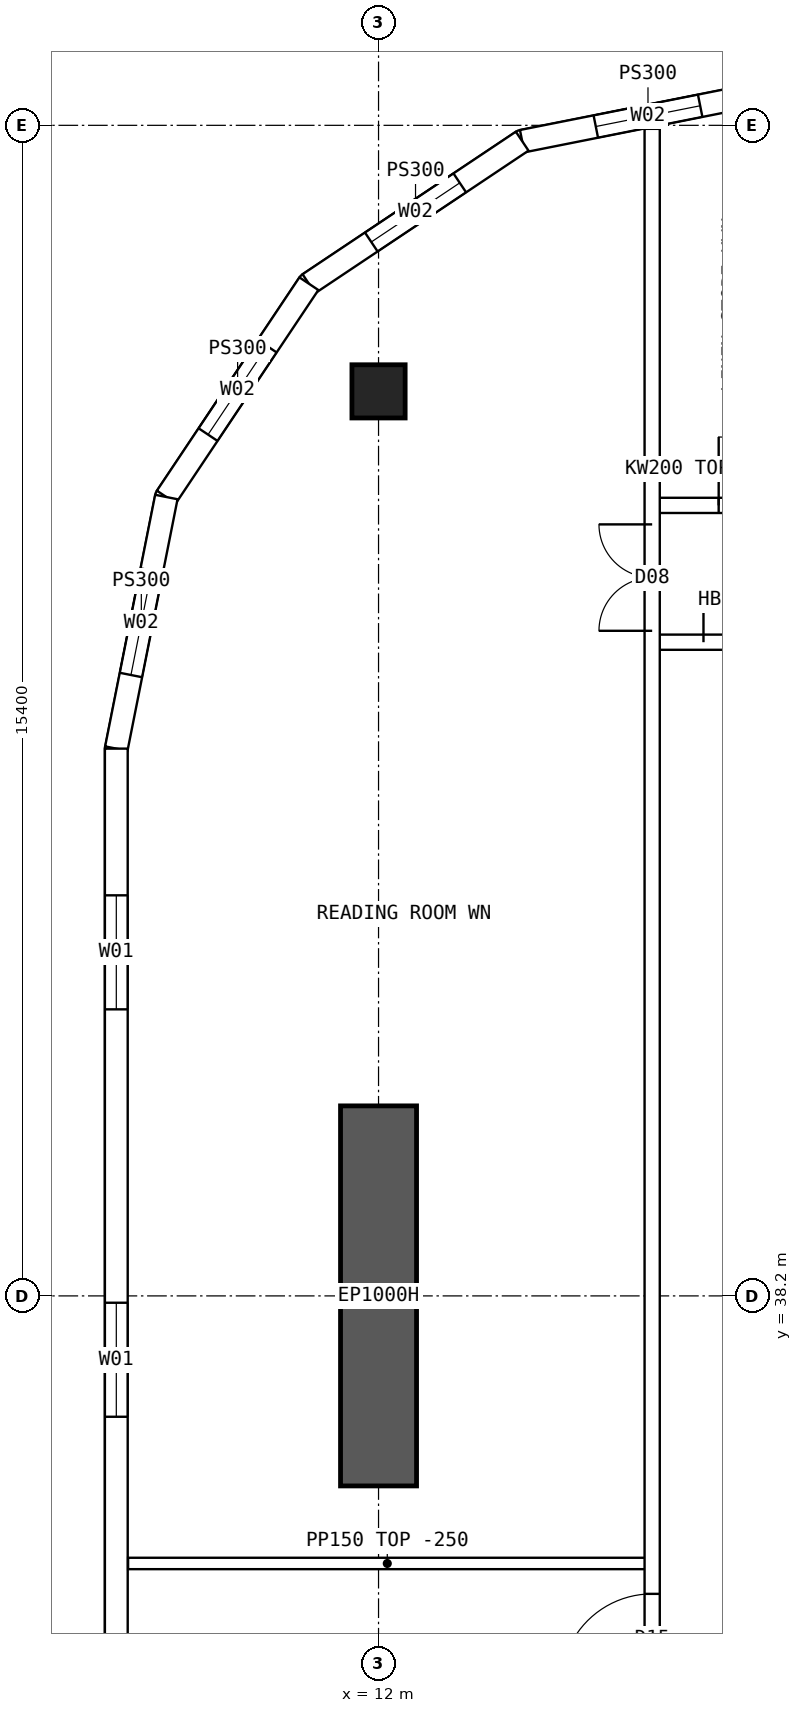
"""IFC4 building model, lengths in metres.
Left out: names, types, materials, properties, quantities, classifications, styles, units other than length and angle.
Written with IfcOpenShell. Run it as: python <this file> out.ifc"""

import sys

from ifc_helpers import new_model, si_unit, direction, frame, frame_2d, origin, origin_2d, place, context, subcontext, project, spatial, polyline, rectangle, hollow_rectangle, outline, extrude, element, fill, save


model = new_model("IFC4")
c1 = context("Model", 3, precision=1e-05, world=origin(), true_north=direction((0.0, 1.0)))
c2 = subcontext(c1, "Body", "Model", "MODEL_VIEW")
j1 = project(units=[si_unit("LENGTHUNIT", "METRE"), si_unit("PLANEANGLEUNIT", "RADIAN")], contexts=[c1])
p1 = place(None, origin())
s1 = spatial("IfcSite", under=j1, at=p1, CompositionType="ELEMENT")
p2 = place(p1, origin())
s2 = spatial("IfcBuilding", under=s1, at=p2, CompositionType="ELEMENT")
p3 = place(p2, frame((0.0, 0.0, 186.1)))
s3 = spatial("IfcBuildingStorey", under=s2, at=p3, CompositionType="ELEMENT", Elevation=186.1)
p4 = place(p3, frame((12.0, 50.1, 0.0), z_axis=(0.0, 0.0, 1.0), x_axis=(1.0, 0.0, 0.0)))
e1 = element("IfcColumn", 1, at=p4, inside=s3, PredefinedType="COLUMN", context=c2, shape_type="SweptSolid", body=[
    extrude(hollow_rectangle(XDim=0.7, YDim=0.7, WallThickness=0.07, at=origin_2d()), origin(), (0.0, 0.0, 1.0), 3.75),
])
p5 = place(p3, frame((12.0, 35.7, 0.0), z_axis=(0.0, 0.0, 1.0), x_axis=(0.0, 1.0, 0.0)))
e2 = element("IfcWall", 2, at=p5, inside=s3, PredefinedType="SHEAR", context=c2, shape_type="SweptSolid", body=[
    extrude(rectangle(XDim=5.0, YDim=1.0, at=frame_2d((2.5, 0.0))), origin(), (0.0, 0.0, 1.0), 3.75),
])
p6 = place(p3, frame((8.55, 45.4, 0.0), z_axis=(0.0, 0.0, 1.0), x_axis=(0.0, -1.0, 0.0)))
e3 = element("IfcWall", 3, at=p6, inside=s3, PredefinedType="SOLIDWALL", context=c2, shape_type="SweptSolid", body=[
    extrude(outline(polyline([(-0.015, -0.15), (26.815, -0.15), (26.785, 0.15), (0.015, 0.15), (-0.015, -0.15)])), origin(), (0.0, 0.0, 1.0), 3.5),
])
p7 = place(p6, frame((1.93, 0.0, 0.9)))
e4 = element("IfcOpeningElement", 4, at=p7, cuts=e3, PredefinedType="OPENING", context=c2, shape_type="SweptSolid", body=[
    extrude(rectangle(XDim=1.5, YDim=2.0, at=frame_2d((0.75, 1.0))), frame((0.0, 0.16, 0.0), z_axis=(0.0, -1.0, 0.0), x_axis=(1.0, 0.0, 0.0)), (0.0, 0.0, 1.0), 0.32),
])
p8 = place(p6, frame((7.29, 0.0, 0.9)))
e5 = element("IfcOpeningElement", 5, at=p8, cuts=e3, PredefinedType="OPENING", context=c2, shape_type="SweptSolid", body=[
    extrude(rectangle(XDim=1.5, YDim=2.0, at=frame_2d((0.75, 1.0))), frame((0.0, 0.16, 0.0), z_axis=(0.0, -1.0, 0.0), x_axis=(1.0, 0.0, 0.0)), (0.0, 0.0, 1.0), 0.32),
])
p9 = place(p6, frame((12.65, 0.0, 0.9)))
e6 = element("IfcOpeningElement", 6, at=p9, cuts=e3, PredefinedType="OPENING", context=c2, shape_type="SweptSolid", body=[
    extrude(rectangle(XDim=1.5, YDim=2.0, at=frame_2d((0.75, 1.0))), frame((0.0, 0.16, 0.0), z_axis=(0.0, -1.0, 0.0), x_axis=(1.0, 0.0, 0.0)), (0.0, 0.0, 1.0), 0.32),
])
p10 = place(p6, frame((18.01, 0.0, 0.9)))
e7 = element("IfcOpeningElement", 7, at=p10, cuts=e3, PredefinedType="OPENING", context=c2, shape_type="SweptSolid", body=[
    extrude(rectangle(XDim=1.5, YDim=2.0, at=frame_2d((0.75, 1.0))), frame((0.0, 0.16, 0.0), z_axis=(0.0, -1.0, 0.0), x_axis=(1.0, 0.0, 0.0)), (0.0, 0.0, 1.0), 0.32),
])
p11 = place(p6, frame((23.37, 0.0, 0.9)))
e8 = element("IfcOpeningElement", 8, at=p11, cuts=e3, PredefinedType="OPENING", context=c2, shape_type="SweptSolid", body=[
    extrude(rectangle(XDim=1.5, YDim=2.0, at=frame_2d((0.75, 1.0))), frame((0.0, 0.16, 0.0), z_axis=(0.0, -1.0, 0.0), x_axis=(1.0, 0.0, 0.0)), (0.0, 0.0, 1.0), 0.32),
])
p12 = place(p3, frame((17.2, 54.05, 0.0), z_axis=(0.0, 0.0, 1.0), x_axis=(-0.98078325777, -0.195100490205, 0.0)))
e9 = element("IfcWall", 9, at=p12, inside=s3, PredefinedType="SOLIDWALL", context=c2, shape_type="SweptSolid", body=[
    extrude(outline(polyline([(-0.03, -0.15), (3.405, -0.15), (3.345, 0.15), (0.03, 0.15), (-0.03, -0.15)])), origin(), (0.0, 0.0, 1.0), 3.5),
])
p13 = place(p12, frame((0.988, 0.0, 0.9)))
e10 = element("IfcOpeningElement", 10, at=p13, cuts=e9, PredefinedType="OPENING", context=c2, shape_type="SweptSolid", body=[
    extrude(rectangle(XDim=1.4, YDim=1.8, at=frame_2d((0.7, 0.9))), frame((0.0, 0.16, 0.0), z_axis=(0.0, -1.0, 0.0), x_axis=(1.0, 0.0, 0.0)), (0.0, 0.0, 1.0), 0.32),
])
p14 = place(p3, frame((13.89, 53.392, 0.0), z_axis=(0.0, 0.0, 1.0), x_axis=(-0.831493450887, -0.555534554399, 0.0)))
e11 = element("IfcWall", 11, at=p14, inside=s3, PredefinedType="SOLIDWALL", context=c2, shape_type="SweptSolid", body=[
    extrude(outline(polyline([(-0.03, -0.15), (3.405, -0.15), (3.345, 0.15), (0.03, 0.15), (-0.03, -0.15)])), origin(), (0.0, 0.0, 1.0), 3.5),
])
p15 = place(p14, frame((0.988, 0.0, 0.9)))
e12 = element("IfcOpeningElement", 12, at=p15, cuts=e11, PredefinedType="OPENING", context=c2, shape_type="SweptSolid", body=[
    extrude(rectangle(XDim=1.4, YDim=1.8, at=frame_2d((0.7, 0.9))), frame((0.0, 0.16, 0.0), z_axis=(0.0, -1.0, 0.0), x_axis=(1.0, 0.0, 0.0)), (0.0, 0.0, 1.0), 0.32),
])
p16 = place(p3, frame((11.083, 51.517, 0.0), z_axis=(0.0, 0.0, 1.0), x_axis=(-0.555534554399, -0.831493450887, 0.0)))
e13 = element("IfcWall", 13, at=p16, inside=s3, PredefinedType="SOLIDWALL", context=c2, shape_type="SweptSolid", body=[
    extrude(outline(polyline([(-0.03, -0.15), (3.405, -0.15), (3.345, 0.15), (0.03, 0.15), (-0.03, -0.15)])), origin(), (0.0, 0.0, 1.0), 3.5),
])
p17 = place(p16, frame((0.988, 0.0, 0.9)))
e14 = element("IfcOpeningElement", 14, at=p17, cuts=e13, PredefinedType="OPENING", context=c2, shape_type="SweptSolid", body=[
    extrude(rectangle(XDim=1.4, YDim=1.8, at=frame_2d((0.7, 0.9))), frame((0.0, 0.16, 0.0), z_axis=(0.0, -1.0, 0.0), x_axis=(1.0, 0.0, 0.0)), (0.0, 0.0, 1.0), 0.32),
])
p18 = place(p3, frame((9.208, 48.71, 0.0), z_axis=(0.0, 0.0, 1.0), x_axis=(-0.19508664885, -0.980786011034, 0.0)))
e15 = element("IfcWall", 15, at=p18, inside=s3, PredefinedType="SOLIDWALL", context=c2, shape_type="SweptSolid", body=[
    extrude(outline(polyline([(-0.03, -0.15), (3.39, -0.15), (3.36, 0.15), (0.03, 0.15), (-0.03, -0.15)])), origin(), (0.0, 0.0, 1.0), 3.5),
])
p19 = place(p18, frame((0.988, 0.0, 0.9)))
e16 = element("IfcOpeningElement", 16, at=p19, cuts=e15, PredefinedType="OPENING", context=c2, shape_type="SweptSolid", body=[
    extrude(rectangle(XDim=1.4, YDim=1.8, at=frame_2d((0.7, 0.9))), frame((0.0, 0.16, 0.0), z_axis=(0.0, -1.0, 0.0), x_axis=(1.0, 0.0, 0.0)), (0.0, 0.0, 1.0), 0.32),
])
p20 = place(p3, frame((15.6, 48.6, 0.0), z_axis=(0.0, 0.0, 1.0), x_axis=(1.0, 0.0, 0.0)))
e17 = element("IfcWall", 17, at=p20, inside=s3, PredefinedType="SOLIDWALL", context=c2, shape_type="SweptSolid", body=[
    extrude(rectangle(XDim=1.975, YDim=0.2, at=frame_2d((0.987, 0.0))), origin(), (0.0, 0.0, 1.0), 3.5),
])
p21 = place(p20, frame((0.875, 0.0, 0.0)))
e18 = element("IfcOpeningElement", 18, at=p21, cuts=e17, PredefinedType="OPENING", context=c2, shape_type="SweptSolid", body=[
    extrude(rectangle(XDim=0.9, YDim=2.1, at=frame_2d((0.45, 1.05))), frame((0.0, 0.11, 0.0), z_axis=(0.0, -1.0, 0.0), x_axis=(1.0, 0.0, 0.0)), (0.0, 0.0, 1.0), 0.22),
])
p22 = place(p3, frame((15.6, 46.8, 0.0), z_axis=(0.0, 0.0, 1.0), x_axis=(1.0, 0.0, 0.0)))
e19 = element("IfcWall", 19, at=p22, inside=s3, PredefinedType="SOLIDWALL", context=c2, shape_type="SweptSolid", body=[
    extrude(rectangle(XDim=1.975, YDim=0.2, at=frame_2d((0.987, 0.0))), origin(), (0.0, 0.0, 1.0), 3.5),
])
p23 = place(p22, frame((0.675, 0.0, 0.0)))
e20 = element("IfcOpeningElement", 20, at=p23, cuts=e19, PredefinedType="OPENING", context=c2, shape_type="SweptSolid", body=[
    extrude(rectangle(XDim=1.2, YDim=2.1, at=frame_2d((0.6, 1.05))), frame((0.0, 0.11, 0.0), z_axis=(0.0, -1.0, 0.0), x_axis=(1.0, 0.0, 0.0)), (0.0, 0.0, 1.0), 0.22),
])
p24 = place(p3, frame((15.6, 10.446, 0.0), z_axis=(0.0, 0.0, 1.0), x_axis=(0.0, 1.0, 0.0)))
e21 = element("IfcWall", 21, at=p24, inside=s3, PredefinedType="SOLIDWALL", context=c2, shape_type="SweptSolid", body=[
    extrude(rectangle(XDim=43.107, YDim=0.2, at=frame_2d((21.554, 0.0))), origin(), (0.0, 0.0, 1.0), 3.5),
])
p25 = place(p24, frame((22.634, 0.0, 0.0)))
e22 = element("IfcOpeningElement", 22, at=p25, cuts=e21, PredefinedType="OPENING", context=c2, shape_type="SweptSolid", body=[
    extrude(rectangle(XDim=1.2, YDim=2.1, at=frame_2d((0.6, 1.05))), frame((0.0, 0.11, 0.0), z_axis=(0.0, -1.0, 0.0), x_axis=(1.0, 0.0, 0.0)), (0.0, 0.0, 1.0), 0.22),
])
p26 = place(p24, frame((5.104, 0.0, 0.0)))
e23 = element("IfcOpeningElement", 23, at=p26, cuts=e21, PredefinedType="OPENING", context=c2, shape_type="SweptSolid", body=[
    extrude(rectangle(XDim=1.4, YDim=2.1, at=frame_2d((0.7, 1.05))), frame((0.0, 0.11, 0.0), z_axis=(0.0, -1.0, 0.0), x_axis=(1.0, 0.0, 0.0)), (0.0, 0.0, 1.0), 0.22),
])
p27 = place(p24, frame((36.504, 0.0, 0.0)))
e24 = element("IfcOpeningElement", 24, at=p27, cuts=e21, PredefinedType="OPENING", context=c2, shape_type="SweptSolid", body=[
    extrude(rectangle(XDim=1.4, YDim=2.1, at=frame_2d((0.7, 1.05))), frame((0.0, 0.11, 0.0), z_axis=(0.0, -1.0, 0.0), x_axis=(1.0, 0.0, 0.0)), (0.0, 0.0, 1.0), 0.22),
])
p28 = place(p3, frame((8.705, 34.68, 0.0), z_axis=(0.0, 0.0, 1.0), x_axis=(1.0, 0.0, 0.0)))
e25 = element("IfcWall", 25, at=p28, inside=s3, PredefinedType="PARTITIONING", context=c2, shape_type="SweptSolid", body=[
    extrude(outline(polyline([(0.0, 0.0), (6.82, 0.0), (6.82, 3.5), (3.597, 3.5), (3.595, 3.05), (2.997, 3.05), (2.995, 3.5), (0.0, 3.5), (0.0, 0.0)])), frame((0.0, 0.075, 0.0), z_axis=(0.0, -1.0, 0.0), x_axis=(1.0, 0.0, 0.0)), (0.0, 0.0, 1.0), 0.15),
])
p29 = place(p7, origin())
e26 = element("IfcWindow", 26, at=p29, inside=s3, PartitioningType="SINGLE_PANEL", PredefinedType="WINDOW", context=c2, shape_type="SweptSolid", body=[
    extrude(rectangle(XDim=1.5, YDim=2.0, at=frame_2d((0.75, 1.0))), frame((0.0, 0.03, 0.0), z_axis=(0.0, -1.0, 0.0), x_axis=(1.0, 0.0, 0.0)), (0.0, 0.0, 1.0), 0.06),
])
fill(e4, e26)
p30 = place(p8, origin())
e27 = element("IfcWindow", 27, at=p30, inside=s3, PartitioningType="SINGLE_PANEL", PredefinedType="WINDOW", context=c2, shape_type="SweptSolid", body=[
    extrude(rectangle(XDim=1.5, YDim=2.0, at=frame_2d((0.75, 1.0))), frame((0.0, 0.03, 0.0), z_axis=(0.0, -1.0, 0.0), x_axis=(1.0, 0.0, 0.0)), (0.0, 0.0, 1.0), 0.06),
])
fill(e5, e27)
p31 = place(p13, origin())
e28 = element("IfcWindow", 28, at=p31, inside=s3, PartitioningType="SINGLE_PANEL", PredefinedType="WINDOW", context=c2, shape_type="SweptSolid", body=[
    extrude(rectangle(XDim=1.4, YDim=1.8, at=frame_2d((0.7, 0.9))), frame((0.0, 0.03, 0.0), z_axis=(0.0, -1.0, 0.0), x_axis=(1.0, 0.0, 0.0)), (0.0, 0.0, 1.0), 0.06),
])
fill(e10, e28)
p32 = place(p15, origin())
e29 = element("IfcWindow", 29, at=p32, inside=s3, PartitioningType="SINGLE_PANEL", PredefinedType="WINDOW", context=c2, shape_type="SweptSolid", body=[
    extrude(rectangle(XDim=1.4, YDim=1.8, at=frame_2d((0.7, 0.9))), frame((0.0, 0.03, 0.0), z_axis=(0.0, -1.0, 0.0), x_axis=(1.0, 0.0, 0.0)), (0.0, 0.0, 1.0), 0.06),
])
fill(e12, e29)
p33 = place(p17, origin())
e30 = element("IfcWindow", 30, at=p33, inside=s3, PartitioningType="SINGLE_PANEL", PredefinedType="WINDOW", context=c2, shape_type="SweptSolid", body=[
    extrude(rectangle(XDim=1.4, YDim=1.8, at=frame_2d((0.7, 0.9))), frame((0.0, 0.03, 0.0), z_axis=(0.0, -1.0, 0.0), x_axis=(1.0, 0.0, 0.0)), (0.0, 0.0, 1.0), 0.06),
])
fill(e14, e30)
p34 = place(p19, origin())
e31 = element("IfcWindow", 31, at=p34, inside=s3, PartitioningType="SINGLE_PANEL", PredefinedType="WINDOW", context=c2, shape_type="SweptSolid", body=[
    extrude(rectangle(XDim=1.4, YDim=1.8, at=frame_2d((0.7, 0.9))), frame((0.0, 0.03, 0.0), z_axis=(0.0, -1.0, 0.0), x_axis=(1.0, 0.0, 0.0)), (0.0, 0.0, 1.0), 0.06),
])
fill(e16, e31)
p35 = place(p23, origin())
e32 = element("IfcDoor", 32, at=p35, inside=s3, OperationType="DOUBLE_DOOR_SINGLE_SWING", PredefinedType="DOOR", context=c2, shape_type="SweptSolid", body=[
    extrude(rectangle(XDim=1.2, YDim=2.1, at=frame_2d((0.6, 1.05))), frame((0.0, 0.025, 0.0), z_axis=(0.0, -1.0, 0.0), x_axis=(1.0, 0.0, 0.0)), (0.0, 0.0, 1.0), 0.05),
])
fill(e20, e32)
p36 = place(p25, origin())
e33 = element("IfcDoor", 33, at=p36, inside=s3, OperationType="SINGLE_SWING_LEFT", PredefinedType="DOOR", context=c2, shape_type="SweptSolid", body=[
    extrude(rectangle(XDim=1.2, YDim=2.1, at=frame_2d((0.6, 1.05))), frame((0.0, 0.025, 0.0), z_axis=(0.0, -1.0, 0.0), x_axis=(1.0, 0.0, 0.0)), (0.0, 0.0, 1.0), 0.05),
])
fill(e22, e33)
p37 = place(p27, origin())
e34 = element("IfcDoor", 34, at=p37, inside=s3, OperationType="DOUBLE_DOOR_SINGLE_SWING", PredefinedType="DOOR", context=c2, shape_type="SweptSolid", body=[
    extrude(rectangle(XDim=1.4, YDim=2.1, at=frame_2d((0.7, 1.05))), frame((0.0, 0.025, 0.0), z_axis=(0.0, -1.0, 0.0), x_axis=(1.0, 0.0, 0.0)), (0.0, 0.0, 1.0), 0.05),
])
fill(e24, e34)
p38 = place(p21, origin())
e35 = element("IfcDoor", 35, at=p38, inside=s3, OperationType="SINGLE_SWING_LEFT", PredefinedType="DOOR", context=c2, shape_type="SweptSolid", body=[
    extrude(rectangle(XDim=0.9, YDim=2.1, at=frame_2d((0.45, 1.05))), frame((0.0, 0.025, 0.0), z_axis=(0.0, -1.0, 0.0), x_axis=(1.0, 0.0, 0.0)), (0.0, 0.0, 1.0), 0.05),
])
fill(e18, e35)
save(model, sys.argv[1])
